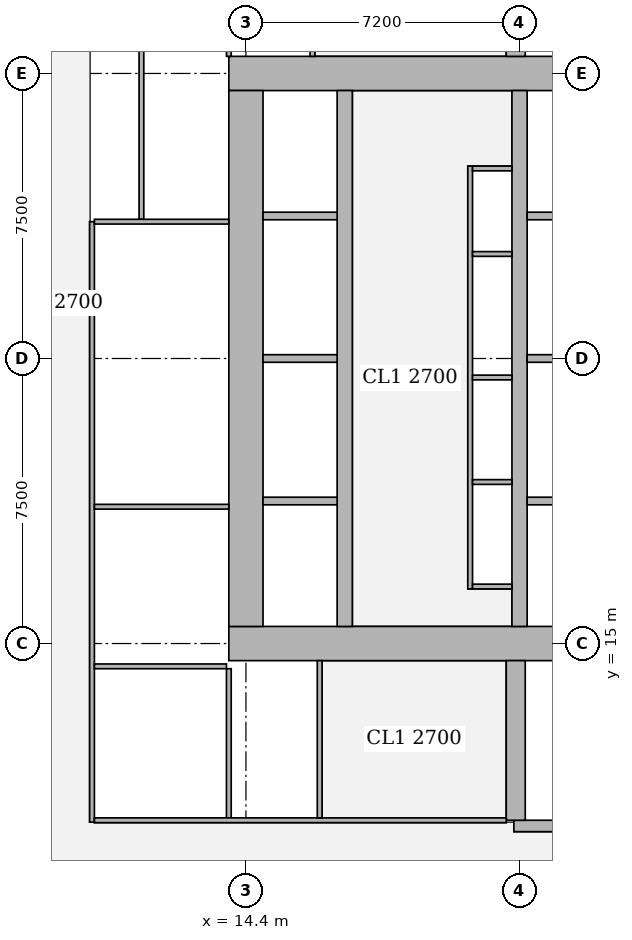
"""IFC4 building model, lengths in metres.
Left out: names, types, materials, properties, quantities, classifications, styles, units other than length and angle.
Written with IfcOpenShell. Run it as: python <this file> out.ifc"""

import sys

from ifc_helpers import new_model, si_unit, direction, frame, frame_2d, origin, place, context, subcontext, project, spatial, rectangle, extrude, element, fill, save


model = new_model("IFC4")
c1 = context("Model", 3, precision=1e-05, world=origin(), true_north=direction((0.0, 1.0)))
c2 = subcontext(c1, "Body", "Model", "MODEL_VIEW")
j1 = project(units=[si_unit("LENGTHUNIT", "METRE"), si_unit("PLANEANGLEUNIT", "RADIAN")], contexts=[c1])
p1 = place(None, origin())
s1 = spatial("IfcSite", under=j1, at=p1, CompositionType="ELEMENT")
p2 = place(p1, origin())
s2 = spatial("IfcBuilding", under=s1, at=p2, CompositionType="ELEMENT")
p3 = place(p2, frame((0.0, 0.0, 20.0)))
s3 = spatial("IfcBuildingStorey", under=s2, at=p3, CompositionType="ELEMENT", Elevation=20.0)
p4 = place(p3, frame((13.95, 15.0, 0.0), z_axis=(0.0, 0.0, 1.0), x_axis=(1.0, 0.0, 0.0)))
e1 = element("IfcWall", 1, at=p4, inside=s3, PredefinedType="SHEAR", context=c2, shape_type="SweptSolid", body=[
    extrude(rectangle(XDim=15.3, YDim=0.9, at=frame_2d((7.65, 0.0))), origin(), (0.0, 0.0, 1.0), 3.75),
])
p5 = place(p4, frame((4.45, 0.0, 0.0)))
e2 = element("IfcOpeningElement", 2, at=p5, cuts=e1, PredefinedType="OPENING", context=c2, shape_type="SweptSolid", body=[
    extrude(rectangle(XDim=1.8, YDim=2.1, at=frame_2d((0.9, 1.05))), frame((0.0, 0.46, 0.0), z_axis=(0.0, -1.0, 0.0), x_axis=(1.0, 0.0, 0.0)), (0.0, 0.0, 1.0), 0.92),
])
p6 = place(p4, frame((10.7, 0.0, 0.0)))
e3 = element("IfcOpeningElement", 3, at=p6, cuts=e1, PredefinedType="OPENING", context=c2, shape_type="SweptSolid", body=[
    extrude(rectangle(XDim=1.1, YDim=2.1, at=frame_2d((0.55, 1.05))), frame((0.0, 0.46, 0.0), z_axis=(0.0, -1.0, 0.0), x_axis=(1.0, 0.0, 0.0)), (0.0, 0.0, 1.0), 0.92),
])
p7 = place(p3, frame((13.95, 30.0, 0.0), z_axis=(0.0, 0.0, 1.0), x_axis=(1.0, 0.0, 0.0)))
e4 = element("IfcWall", 4, at=p7, inside=s3, PredefinedType="SHEAR", context=c2, shape_type="SweptSolid", body=[
    extrude(rectangle(XDim=15.3, YDim=0.9, at=frame_2d((7.65, 0.0))), origin(), (0.0, 0.0, 1.0), 3.75),
])
p8 = place(p7, frame((4.45, 0.0, 0.0)))
e5 = element("IfcOpeningElement", 5, at=p8, cuts=e4, PredefinedType="OPENING", context=c2, shape_type="SweptSolid", body=[
    extrude(rectangle(XDim=1.8, YDim=2.1, at=frame_2d((0.9, 1.05))), frame((0.0, 0.46, 0.0), z_axis=(0.0, -1.0, 0.0), x_axis=(1.0, 0.0, 0.0)), (0.0, 0.0, 1.0), 0.92),
])
p9 = place(p7, frame((10.7, 0.0, 0.0)))
e6 = element("IfcOpeningElement", 6, at=p9, cuts=e4, PredefinedType="OPENING", context=c2, shape_type="SweptSolid", body=[
    extrude(rectangle(XDim=1.1, YDim=2.1, at=frame_2d((0.55, 1.05))), frame((0.0, 0.46, 0.0), z_axis=(0.0, -1.0, 0.0), x_axis=(1.0, 0.0, 0.0)), (0.0, 0.0, 1.0), 0.92),
])
p10 = place(p3, frame((14.4, 15.45, 0.0), z_axis=(0.0, 0.0, 1.0), x_axis=(0.0, 1.0, 0.0)))
e7 = element("IfcWall", 7, at=p10, inside=s3, PredefinedType="SHEAR", context=c2, shape_type="SweptSolid", body=[
    extrude(rectangle(XDim=14.1, YDim=0.9, at=frame_2d((7.05, 0.0))), origin(), (0.0, 0.0, 1.0), 3.75),
])
p11 = place(p3, frame((17.0, 15.45, 0.0), z_axis=(0.0, 0.0, 1.0), x_axis=(0.0, 1.0, 0.0)))
e8 = element("IfcWall", 8, at=p11, inside=s3, PredefinedType="SHEAR", context=c2, shape_type="SweptSolid", body=[
    extrude(rectangle(XDim=14.1, YDim=0.4, at=frame_2d((7.05, 0.0))), origin(), (0.0, 0.0, 1.0), 3.75),
])
p12 = place(p11, frame((0.875, 0.0, 0.0)))
e9 = element("IfcOpeningElement", 9, at=p12, cuts=e8, PredefinedType="OPENING", context=c2, shape_type="SweptSolid", body=[
    extrude(rectangle(XDim=1.1, YDim=2.1, at=frame_2d((0.55, 1.05))), frame((0.0, 0.21, 0.0), z_axis=(0.0, -1.0, 0.0), x_axis=(1.0, 0.0, 0.0)), (0.0, 0.0, 1.0), 0.42),
])
p13 = place(p11, frame((4.625, 0.0, 0.0)))
e10 = element("IfcOpeningElement", 10, at=p13, cuts=e8, PredefinedType="OPENING", context=c2, shape_type="SweptSolid", body=[
    extrude(rectangle(XDim=1.1, YDim=2.1, at=frame_2d((0.55, 1.05))), frame((0.0, 0.21, 0.0), z_axis=(0.0, -1.0, 0.0), x_axis=(1.0, 0.0, 0.0)), (0.0, 0.0, 1.0), 0.42),
])
p14 = place(p11, frame((8.375, 0.0, 0.0)))
e11 = element("IfcOpeningElement", 11, at=p14, cuts=e8, PredefinedType="OPENING", context=c2, shape_type="SweptSolid", body=[
    extrude(rectangle(XDim=1.1, YDim=2.1, at=frame_2d((0.55, 1.05))), frame((0.0, 0.21, 0.0), z_axis=(0.0, -1.0, 0.0), x_axis=(1.0, 0.0, 0.0)), (0.0, 0.0, 1.0), 0.42),
])
p15 = place(p11, frame((12.125, 0.0, 0.0)))
e12 = element("IfcOpeningElement", 12, at=p15, cuts=e8, PredefinedType="OPENING", context=c2, shape_type="SweptSolid", body=[
    extrude(rectangle(XDim=1.1, YDim=2.1, at=frame_2d((0.55, 1.05))), frame((0.0, 0.21, 0.0), z_axis=(0.0, -1.0, 0.0), x_axis=(1.0, 0.0, 0.0)), (0.0, 0.0, 1.0), 0.42),
])
p16 = place(p3, frame((21.6, 15.45, 0.0), z_axis=(0.0, 0.0, 1.0), x_axis=(0.0, 1.0, 0.0)))
e13 = element("IfcWall", 13, at=p16, inside=s3, PredefinedType="SHEAR", context=c2, shape_type="SweptSolid", body=[
    extrude(rectangle(XDim=14.1, YDim=0.4, at=frame_2d((7.05, 0.0))), origin(), (0.0, 0.0, 1.0), 3.75),
])
p17 = place(p3, frame((21.45, 10.2, 0.0), z_axis=(0.0, 0.0, 1.0), x_axis=(1.0, 0.0, 0.0)))
e14 = element("IfcWall", 14, at=p17, inside=s3, PredefinedType="SHEAR", context=c2, shape_type="SweptSolid", body=[
    extrude(rectangle(XDim=7.5, YDim=0.3, at=frame_2d((3.75, 0.0))), origin(), (0.0, 0.0, 1.0), 3.75),
])
p18 = place(p17, frame((0.5, 0.0, 0.0)))
e15 = element("IfcOpeningElement", 15, at=p18, cuts=e14, PredefinedType="OPENING", context=c2, shape_type="SweptSolid", body=[
    extrude(rectangle(XDim=1.1, YDim=2.1, at=frame_2d((0.55, 1.05))), frame((0.0, 0.16, 0.0), z_axis=(0.0, -1.0, 0.0), x_axis=(1.0, 0.0, 0.0)), (0.0, 0.0, 1.0), 0.32),
])
for number, where, z_axis, x_axis in (
    (16, (21.5, 10.35, 0.0), (0.0, 0.0, 1.0), (0.0, 1.0, 0.0)),
    (17, (21.5, 30.45, 0.0), (0.0, 0.0, 1.0), (0.0, 1.0, 0.0)),
):
    element("IfcWall", number, at=place(p3, frame(where, z_axis=z_axis, x_axis=x_axis)), inside=s3, PredefinedType="SHEAR", context=c2, shape_type="SweptSolid", body=[
        extrude(rectangle(XDim=4.2, YDim=0.5, at=frame_2d((2.1, 0.0))), origin(), (0.0, 0.0, 1.0), 3.75),
    ])
p19 = place(p3, frame((10.35, 10.3, 0.0), z_axis=(0.0, 0.0, 1.0), x_axis=(0.0, 1.0, 0.0)))
e18 = element("IfcWall", 18, at=p19, inside=s3, PredefinedType="PARTITIONING", context=c2, shape_type="SweptSolid", body=[
    extrude(rectangle(XDim=15.8, YDim=0.125, at=frame_2d((7.9, 0.0))), origin(), (0.0, 0.0, 1.0), 3.5),
])
p20 = place(p19, frame((1.55, 0.0, 0.0)))
e19 = element("IfcOpeningElement", 19, at=p20, cuts=e18, PredefinedType="OPENING", context=c2, shape_type="SweptSolid", body=[
    extrude(rectangle(XDim=1.0, YDim=2.1, at=frame_2d((0.5, 1.05))), frame((0.0, 0.073, 0.0), z_axis=(0.0, -1.0, 0.0), x_axis=(1.0, 0.0, 0.0)), (0.0, 0.0, 1.0), 0.145),
])
p21 = place(p19, frame((5.7, 0.0, 0.0)))
e20 = element("IfcOpeningElement", 20, at=p21, cuts=e18, PredefinedType="OPENING", context=c2, shape_type="SweptSolid", body=[
    extrude(rectangle(XDim=1.0, YDim=2.1, at=frame_2d((0.5, 1.05))), frame((0.0, 0.073, 0.0), z_axis=(0.0, -1.0, 0.0), x_axis=(1.0, 0.0, 0.0)), (0.0, 0.0, 1.0), 0.145),
])
p22 = place(p19, frame((11.55, 0.0, 0.0)))
e21 = element("IfcOpeningElement", 21, at=p22, cuts=e18, PredefinedType="OPENING", context=c2, shape_type="SweptSolid", body=[
    extrude(rectangle(XDim=1.0, YDim=2.1, at=frame_2d((0.5, 1.05))), frame((0.0, 0.073, 0.0), z_axis=(0.0, -1.0, 0.0), x_axis=(1.0, 0.0, 0.0)), (0.0, 0.0, 1.0), 0.145),
])
p23 = place(p3, frame((11.65, 26.163, 0.0), z_axis=(0.0, 0.0, 1.0), x_axis=(0.0, 1.0, 0.0)))
e22 = element("IfcWall", 22, at=p23, inside=s3, PredefinedType="PARTITIONING", context=c2, shape_type="SweptSolid", body=[
    extrude(rectangle(XDim=5.275, YDim=0.125, at=frame_2d((2.637, 0.0))), origin(), (0.0, 0.0, 1.0), 3.5),
])
p24 = place(p23, frame((2.137, 0.0, 0.0)))
e23 = element("IfcOpeningElement", 23, at=p24, cuts=e22, PredefinedType="OPENING", context=c2, shape_type="SweptSolid", body=[
    extrude(rectangle(XDim=1.0, YDim=2.1, at=frame_2d((0.5, 1.05))), frame((0.0, 0.073, 0.0), z_axis=(0.0, -1.0, 0.0), x_axis=(1.0, 0.0, 0.0)), (0.0, 0.0, 1.0), 0.145),
])
p25 = place(p3, frame((10.413, 14.4, 0.0), z_axis=(0.0, 0.0, 1.0), x_axis=(1.0, 0.0, 0.0)))
e24 = element("IfcWall", 24, at=p25, inside=s3, PredefinedType="PARTITIONING", context=c2, shape_type="SweptSolid", body=[
    extrude(rectangle(XDim=3.475, YDim=0.125, at=frame_2d((1.737, 0.0))), origin(), (0.0, 0.0, 1.0), 3.5),
])
for number, where, z_axis, x_axis in (
    (25, (10.413, 18.6, 0.0), (0.0, 0.0, 1.0), (1.0, 0.0, 0.0)),
    (26, (10.413, 26.1, 0.0), (0.0, 0.0, 1.0), (1.0, 0.0, 0.0)),
):
    element("IfcWall", number, at=place(p3, frame(where, z_axis=z_axis, x_axis=x_axis)), inside=s3, PredefinedType="PARTITIONING", context=c2, shape_type="SweptSolid", body=[
        extrude(rectangle(XDim=3.537, YDim=0.125, at=frame_2d((1.769, 0.0))), origin(), (0.0, 0.0, 1.0), 3.5),
    ])
p26 = place(p3, frame((13.95, 10.413, 0.0), z_axis=(0.0, 0.0, 1.0), x_axis=(0.0, 1.0, 0.0)))
e27 = element("IfcWall", 27, at=p26, inside=s3, PredefinedType="PARTITIONING", context=c2, shape_type="SweptSolid", body=[
    extrude(rectangle(XDim=3.925, YDim=0.125, at=frame_2d((1.962, 0.0))), origin(), (0.0, 0.0, 1.0), 3.5),
])
p27 = place(p3, frame((13.95, 30.45, 0.0), z_axis=(0.0, 0.0, 1.0), x_axis=(0.0, 1.0, 0.0)))
e28 = element("IfcWall", 28, at=p27, inside=s3, PredefinedType="PARTITIONING", context=c2, shape_type="SweptSolid", body=[
    extrude(rectangle(XDim=4.137, YDim=0.125, at=frame_2d((2.068, 0.0))), origin(), (0.0, 0.0, 1.0), 3.5),
])
p28 = place(p3, frame((10.413, 10.35, 0.0), z_axis=(0.0, 0.0, 1.0), x_axis=(1.0, 0.0, 0.0)))
e29 = element("IfcWall", 29, at=p28, inside=s3, PredefinedType="PARTITIONING", context=c2, shape_type="SweptSolid", body=[
    extrude(rectangle(XDim=10.837, YDim=0.125, at=frame_2d((5.418, 0.0))), origin(), (0.0, 0.0, 1.0), 3.5),
])
p29 = place(p28, frame((7.582, 0.0, 0.0)))
e30 = element("IfcOpeningElement", 30, at=p29, cuts=e29, PredefinedType="OPENING", context=c2, shape_type="SweptSolid", body=[
    extrude(rectangle(XDim=1.8, YDim=2.1, at=frame_2d((0.9, 1.05))), frame((0.0, 0.073, 0.0), z_axis=(0.0, -1.0, 0.0), x_axis=(1.0, 0.0, 0.0)), (0.0, 0.0, 1.0), 0.145),
])
p30 = place(p3, frame((16.34, 10.413, 0.0), z_axis=(0.0, 0.0, 1.0), x_axis=(0.0, 1.0, 0.0)))
e31 = element("IfcWall", 31, at=p30, inside=s3, PredefinedType="PARTITIONING", context=c2, shape_type="SweptSolid", body=[
    extrude(rectangle(XDim=4.137, YDim=0.125, at=frame_2d((2.068, 0.0))), origin(), (0.0, 0.0, 1.0), 3.5),
])
p31 = place(p30, frame((1.512, 0.0, 0.0)))
e32 = element("IfcOpeningElement", 32, at=p31, cuts=e31, PredefinedType="OPENING", context=c2, shape_type="SweptSolid", body=[
    extrude(rectangle(XDim=1.0, YDim=2.1, at=frame_2d((0.5, 1.05))), frame((0.0, 0.073, 0.0), z_axis=(0.0, -1.0, 0.0), x_axis=(1.0, 0.0, 0.0)), (0.0, 0.0, 1.0), 0.145),
])
p32 = place(p3, frame((16.15, 30.45, 0.0), z_axis=(0.0, 0.0, 1.0), x_axis=(0.0, 1.0, 0.0)))
e33 = element("IfcWall", 33, at=p32, inside=s3, PredefinedType="PARTITIONING", context=c2, shape_type="SweptSolid", body=[
    extrude(rectangle(XDim=4.137, YDim=0.125, at=frame_2d((2.068, 0.0))), origin(), (0.0, 0.0, 1.0), 3.5),
])
p33 = place(p32, frame((1.625, 0.0, 0.0)))
e34 = element("IfcOpeningElement", 34, at=p33, cuts=e33, PredefinedType="OPENING", context=c2, shape_type="SweptSolid", body=[
    extrude(rectangle(XDim=1.0, YDim=2.1, at=frame_2d((0.5, 1.05))), frame((0.0, 0.073, 0.0), z_axis=(0.0, -1.0, 0.0), x_axis=(1.0, 0.0, 0.0)), (0.0, 0.0, 1.0), 0.145),
])
p34 = place(p3, frame((20.3, 16.438, 0.0), z_axis=(0.0, 0.0, 1.0), x_axis=(0.0, 1.0, 0.0)))
e35 = element("IfcWall", 35, at=p34, inside=s3, PredefinedType="PARTITIONING", context=c2, shape_type="SweptSolid", body=[
    extrude(rectangle(XDim=11.124, YDim=0.125, at=frame_2d((5.562, 0.0))), origin(), (0.0, 0.0, 1.0), 3.5),
])
p35 = place(p34, frame((0.937, 0.0, 0.0)))
e36 = element("IfcOpeningElement", 36, at=p35, cuts=e35, PredefinedType="OPENING", context=c2, shape_type="SweptSolid", body=[
    extrude(rectangle(XDim=1.0, YDim=2.1, at=frame_2d((0.5, 1.05))), frame((0.0, 0.073, 0.0), z_axis=(0.0, -1.0, 0.0), x_axis=(1.0, 0.0, 0.0)), (0.0, 0.0, 1.0), 0.145),
])
p36 = place(p34, frame((3.687, 0.0, 0.0)))
e37 = element("IfcOpeningElement", 37, at=p36, cuts=e35, PredefinedType="OPENING", context=c2, shape_type="SweptSolid", body=[
    extrude(rectangle(XDim=1.0, YDim=2.1, at=frame_2d((0.5, 1.05))), frame((0.0, 0.073, 0.0), z_axis=(0.0, -1.0, 0.0), x_axis=(1.0, 0.0, 0.0)), (0.0, 0.0, 1.0), 0.145),
])
p37 = place(p34, frame((6.687, 0.0, 0.0)))
e38 = element("IfcOpeningElement", 38, at=p37, cuts=e35, PredefinedType="OPENING", context=c2, shape_type="SweptSolid", body=[
    extrude(rectangle(XDim=1.0, YDim=2.1, at=frame_2d((0.5, 1.05))), frame((0.0, 0.073, 0.0), z_axis=(0.0, -1.0, 0.0), x_axis=(1.0, 0.0, 0.0)), (0.0, 0.0, 1.0), 0.145),
])
p38 = place(p34, frame((9.437, 0.0, 0.0)))
e39 = element("IfcOpeningElement", 39, at=p38, cuts=e35, PredefinedType="OPENING", context=c2, shape_type="SweptSolid", body=[
    extrude(rectangle(XDim=1.0, YDim=2.1, at=frame_2d((0.5, 1.05))), frame((0.0, 0.073, 0.0), z_axis=(0.0, -1.0, 0.0), x_axis=(1.0, 0.0, 0.0)), (0.0, 0.0, 1.0), 0.145),
])
for number, where, z_axis, x_axis in (
    (40, (20.363, 16.5, 0.0), (0.0, 0.0, 1.0), (1.0, 0.0, 0.0)),
    (41, (20.363, 27.5, 0.0), (0.0, 0.0, 1.0), (1.0, 0.0, 0.0)),
    (42, (20.363, 19.25, 0.0), (0.0, 0.0, 1.0), (1.0, 0.0, 0.0)),
    (43, (20.363, 22.0, 0.0), (0.0, 0.0, 1.0), (1.0, 0.0, 0.0)),
    (44, (20.363, 25.25, 0.0), (0.0, 0.0, 1.0), (1.0, 0.0, 0.0)),
):
    element("IfcWall", number, at=place(p3, frame(where, z_axis=z_axis, x_axis=x_axis)), inside=s3, PredefinedType="PARTITIONING", context=c2, shape_type="SweptSolid", body=[
        extrude(rectangle(XDim=1.037, YDim=0.125, at=frame_2d((0.519, 0.0))), origin(), (0.0, 0.0, 1.0), 3.5),
    ])
p39 = place(p3, frame((14.85, 18.75, 0.0), z_axis=(0.0, 0.0, 1.0), x_axis=(1.0, 0.0, 0.0)))
e45 = element("IfcWall", 45, at=p39, inside=s3, PredefinedType="SOLIDWALL", context=c2, shape_type="SweptSolid", body=[
    extrude(rectangle(XDim=1.95, YDim=0.2, at=frame_2d((0.975, 0.0))), origin(), (0.0, 0.0, 1.0), 3.5),
])
p40 = place(p3, frame((21.8, 18.75, 0.0), z_axis=(0.0, 0.0, 1.0), x_axis=(1.0, 0.0, 0.0)))
e46 = element("IfcWall", 46, at=p40, inside=s3, PredefinedType="SOLIDWALL", context=c2, shape_type="SweptSolid", body=[
    extrude(rectangle(XDim=2.2, YDim=0.2, at=frame_2d((1.1, 0.0))), origin(), (0.0, 0.0, 1.0), 3.5),
])
p41 = place(p3, frame((14.85, 22.5, 0.0), z_axis=(0.0, 0.0, 1.0), x_axis=(1.0, 0.0, 0.0)))
e47 = element("IfcWall", 47, at=p41, inside=s3, PredefinedType="SOLIDWALL", context=c2, shape_type="SweptSolid", body=[
    extrude(rectangle(XDim=1.95, YDim=0.2, at=frame_2d((0.975, 0.0))), origin(), (0.0, 0.0, 1.0), 3.5),
])
p42 = place(p3, frame((21.8, 22.5, 0.0), z_axis=(0.0, 0.0, 1.0), x_axis=(1.0, 0.0, 0.0)))
e48 = element("IfcWall", 48, at=p42, inside=s3, PredefinedType="SOLIDWALL", context=c2, shape_type="SweptSolid", body=[
    extrude(rectangle(XDim=2.2, YDim=0.2, at=frame_2d((1.1, 0.0))), origin(), (0.0, 0.0, 1.0), 3.5),
])
p43 = place(p3, frame((14.85, 26.25, 0.0), z_axis=(0.0, 0.0, 1.0), x_axis=(1.0, 0.0, 0.0)))
e49 = element("IfcWall", 49, at=p43, inside=s3, PredefinedType="SOLIDWALL", context=c2, shape_type="SweptSolid", body=[
    extrude(rectangle(XDim=1.95, YDim=0.2, at=frame_2d((0.975, 0.0))), origin(), (0.0, 0.0, 1.0), 3.5),
])
p44 = place(p3, frame((21.8, 26.25, 0.0), z_axis=(0.0, 0.0, 1.0), x_axis=(1.0, 0.0, 0.0)))
e50 = element("IfcWall", 50, at=p44, inside=s3, PredefinedType="SOLIDWALL", context=c2, shape_type="SweptSolid", body=[
    extrude(rectangle(XDim=2.2, YDim=0.2, at=frame_2d((1.1, 0.0))), origin(), (0.0, 0.0, 1.0), 3.5),
])
p45 = place(p20, origin())
e51 = element("IfcDoor", 51, at=p45, inside=s3, OperationType="SINGLE_SWING_RIGHT", PredefinedType="DOOR", context=c2, shape_type="SweptSolid", body=[
    extrude(rectangle(XDim=1.0, YDim=2.1, at=frame_2d((0.5, 1.05))), frame((0.0, 0.025, 0.0), z_axis=(0.0, -1.0, 0.0), x_axis=(1.0, 0.0, 0.0)), (0.0, 0.0, 1.0), 0.05),
])
fill(e19, e51)
p46 = place(p21, origin())
e52 = element("IfcDoor", 52, at=p46, inside=s3, OperationType="SINGLE_SWING_LEFT", PredefinedType="DOOR", context=c2, shape_type="SweptSolid", body=[
    extrude(rectangle(XDim=1.0, YDim=2.1, at=frame_2d((0.5, 1.05))), frame((0.0, 0.025, 0.0), z_axis=(0.0, -1.0, 0.0), x_axis=(1.0, 0.0, 0.0)), (0.0, 0.0, 1.0), 0.05),
])
fill(e20, e52)
p47 = place(p22, origin())
e53 = element("IfcDoor", 53, at=p47, inside=s3, OperationType="SINGLE_SWING_LEFT", PredefinedType="DOOR", context=c2, shape_type="SweptSolid", body=[
    extrude(rectangle(XDim=1.0, YDim=2.1, at=frame_2d((0.5, 1.05))), frame((0.0, 0.025, 0.0), z_axis=(0.0, -1.0, 0.0), x_axis=(1.0, 0.0, 0.0)), (0.0, 0.0, 1.0), 0.05),
])
fill(e21, e53)
p48 = place(p24, origin())
e54 = element("IfcDoor", 54, at=p48, inside=s3, OperationType="SINGLE_SWING_LEFT", PredefinedType="DOOR", context=c2, shape_type="SweptSolid", body=[
    extrude(rectangle(XDim=1.0, YDim=2.1, at=frame_2d((0.5, 1.05))), frame((0.0, 0.025, 0.0), z_axis=(0.0, -1.0, 0.0), x_axis=(1.0, 0.0, 0.0)), (0.0, 0.0, 1.0), 0.05),
])
fill(e23, e54)
p49 = place(p31, origin())
e55 = element("IfcDoor", 55, at=p49, inside=s3, OperationType="SINGLE_SWING_LEFT", PredefinedType="DOOR", context=c2, shape_type="SweptSolid", body=[
    extrude(rectangle(XDim=1.0, YDim=2.1, at=frame_2d((0.5, 1.05))), frame((0.0, 0.025, 0.0), z_axis=(0.0, -1.0, 0.0), x_axis=(1.0, 0.0, 0.0)), (0.0, 0.0, 1.0), 0.05),
])
fill(e32, e55)
p50 = place(p29, origin())
e56 = element("IfcDoor", 56, at=p50, inside=s3, OperationType="DOUBLE_DOOR_SINGLE_SWING", PredefinedType="DOOR", context=c2, shape_type="SweptSolid", body=[
    extrude(rectangle(XDim=1.8, YDim=2.1, at=frame_2d((0.9, 1.05))), frame((0.0, 0.025, 0.0), z_axis=(0.0, -1.0, 0.0), x_axis=(1.0, 0.0, 0.0)), (0.0, 0.0, 1.0), 0.05),
])
fill(e30, e56)
p51 = place(p35, origin())
e57 = element("IfcDoor", 57, at=p51, inside=s3, OperationType="SINGLE_SWING_RIGHT", PredefinedType="DOOR", context=c2, shape_type="SweptSolid", body=[
    extrude(rectangle(XDim=1.0, YDim=2.1, at=frame_2d((0.5, 1.05))), frame((0.0, 0.025, 0.0), z_axis=(0.0, -1.0, 0.0), x_axis=(1.0, 0.0, 0.0)), (0.0, 0.0, 1.0), 0.05),
])
fill(e36, e57)
p52 = place(p36, origin())
e58 = element("IfcDoor", 58, at=p52, inside=s3, OperationType="SINGLE_SWING_LEFT", PredefinedType="DOOR", context=c2, shape_type="SweptSolid", body=[
    extrude(rectangle(XDim=1.0, YDim=2.1, at=frame_2d((0.5, 1.05))), frame((0.0, 0.025, 0.0), z_axis=(0.0, -1.0, 0.0), x_axis=(1.0, 0.0, 0.0)), (0.0, 0.0, 1.0), 0.05),
])
fill(e37, e58)
p53 = place(p37, origin())
e59 = element("IfcDoor", 59, at=p53, inside=s3, OperationType="SINGLE_SWING_LEFT", PredefinedType="DOOR", context=c2, shape_type="SweptSolid", body=[
    extrude(rectangle(XDim=1.0, YDim=2.1, at=frame_2d((0.5, 1.05))), frame((0.0, 0.025, 0.0), z_axis=(0.0, -1.0, 0.0), x_axis=(1.0, 0.0, 0.0)), (0.0, 0.0, 1.0), 0.05),
])
fill(e38, e59)
p54 = place(p38, origin())
e60 = element("IfcDoor", 60, at=p54, inside=s3, OperationType="SINGLE_SWING_LEFT", PredefinedType="DOOR", context=c2, shape_type="SweptSolid", body=[
    extrude(rectangle(XDim=1.0, YDim=2.1, at=frame_2d((0.5, 1.05))), frame((0.0, 0.025, 0.0), z_axis=(0.0, -1.0, 0.0), x_axis=(1.0, 0.0, 0.0)), (0.0, 0.0, 1.0), 0.05),
])
fill(e39, e60)
p55 = place(p5, origin())
e61 = element("IfcDoor", 61, at=p55, inside=s3, OperationType="DOUBLE_DOOR_SINGLE_SWING", PredefinedType="DOOR", context=c2, shape_type="SweptSolid", body=[
    extrude(rectangle(XDim=1.8, YDim=2.1, at=frame_2d((0.9, 1.05))), frame((0.0, 0.025, 0.0), z_axis=(0.0, -1.0, 0.0), x_axis=(1.0, 0.0, 0.0)), (0.0, 0.0, 1.0), 0.05),
])
fill(e2, e61)
p56 = place(p8, origin())
e62 = element("IfcDoor", 62, at=p56, inside=s3, OperationType="DOUBLE_DOOR_SINGLE_SWING", PredefinedType="DOOR", context=c2, shape_type="SweptSolid", body=[
    extrude(rectangle(XDim=1.8, YDim=2.1, at=frame_2d((0.9, 1.05))), frame((0.0, 0.025, 0.0), z_axis=(0.0, -1.0, 0.0), x_axis=(1.0, 0.0, 0.0)), (0.0, 0.0, 1.0), 0.05),
])
fill(e5, e62)
p57 = place(p12, origin())
e63 = element("IfcDoor", 63, at=p57, inside=s3, OperationType="DOUBLE_DOOR_SLIDING", PredefinedType="DOOR", context=c2, shape_type="SweptSolid", body=[
    extrude(rectangle(XDim=1.1, YDim=2.1, at=frame_2d((0.55, 1.05))), frame((0.0, 0.025, 0.0), z_axis=(0.0, -1.0, 0.0), x_axis=(1.0, 0.0, 0.0)), (0.0, 0.0, 1.0), 0.05),
])
fill(e9, e63)
p58 = place(p13, origin())
e64 = element("IfcDoor", 64, at=p58, inside=s3, OperationType="DOUBLE_DOOR_SLIDING", PredefinedType="DOOR", context=c2, shape_type="SweptSolid", body=[
    extrude(rectangle(XDim=1.1, YDim=2.1, at=frame_2d((0.55, 1.05))), frame((0.0, 0.025, 0.0), z_axis=(0.0, -1.0, 0.0), x_axis=(1.0, 0.0, 0.0)), (0.0, 0.0, 1.0), 0.05),
])
fill(e10, e64)
p59 = place(p14, origin())
e65 = element("IfcDoor", 65, at=p59, inside=s3, OperationType="DOUBLE_DOOR_SLIDING", PredefinedType="DOOR", context=c2, shape_type="SweptSolid", body=[
    extrude(rectangle(XDim=1.1, YDim=2.1, at=frame_2d((0.55, 1.05))), frame((0.0, 0.025, 0.0), z_axis=(0.0, -1.0, 0.0), x_axis=(1.0, 0.0, 0.0)), (0.0, 0.0, 1.0), 0.05),
])
fill(e11, e65)
p60 = place(p15, origin())
e66 = element("IfcDoor", 66, at=p60, inside=s3, OperationType="DOUBLE_DOOR_SLIDING", PredefinedType="DOOR", context=c2, shape_type="SweptSolid", body=[
    extrude(rectangle(XDim=1.1, YDim=2.1, at=frame_2d((0.55, 1.05))), frame((0.0, 0.025, 0.0), z_axis=(0.0, -1.0, 0.0), x_axis=(1.0, 0.0, 0.0)), (0.0, 0.0, 1.0), 0.05),
])
fill(e12, e66)
p61 = place(p18, origin())
e67 = element("IfcDoor", 67, at=p61, inside=s3, OperationType="SINGLE_SWING_LEFT", PredefinedType="DOOR", context=c2, shape_type="SweptSolid", body=[
    extrude(rectangle(XDim=1.1, YDim=2.1, at=frame_2d((0.55, 1.05))), frame((0.0, 0.025, 0.0), z_axis=(0.0, -1.0, 0.0), x_axis=(1.0, 0.0, 0.0)), (0.0, 0.0, 1.0), 0.05),
])
fill(e15, e67)
save(model, sys.argv[1])
